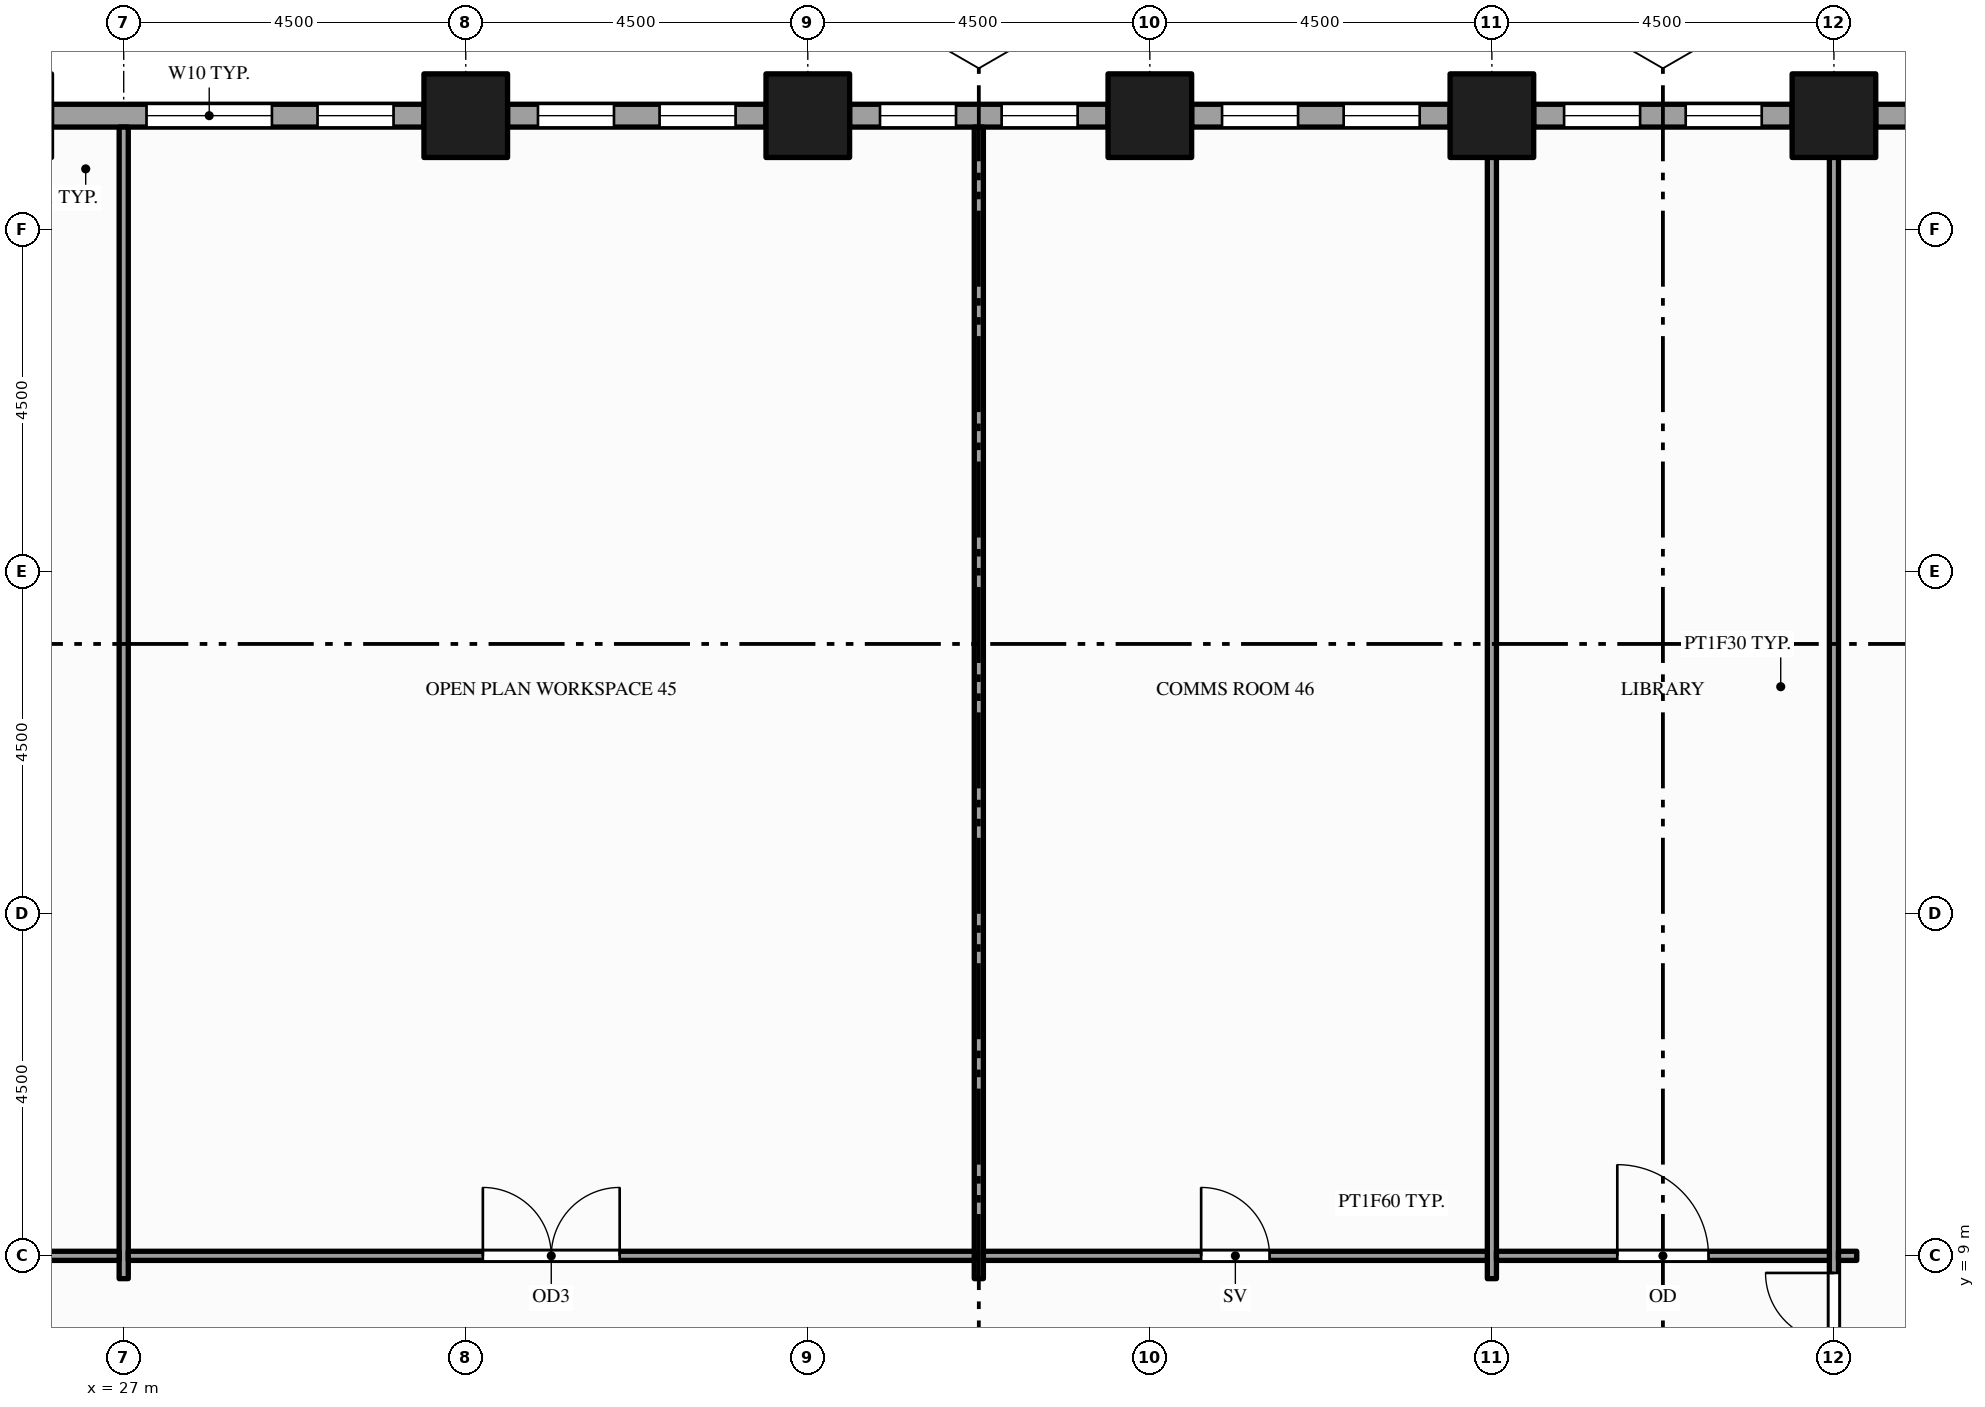
"""IFC4 building model, lengths in metres.
Left out: names, types, materials, properties, quantities, classifications, styles, units other than length and angle.
Written with IfcOpenShell. Run it as: python <this file> out.ifc"""

import sys

from ifc_helpers import new_model, si_unit, direction, frame, frame_2d, origin, origin_2d, place, context, subcontext, project, spatial, rectangle, hollow_rectangle, extrude, element, fill, save


model = new_model("IFC4")
c1 = context("Model", 3, precision=1e-05, world=origin(), true_north=direction((0.0, 1.0)))
c2 = subcontext(c1, "Body", "Model", "MODEL_VIEW")
j1 = project(units=[si_unit("LENGTHUNIT", "METRE"), si_unit("PLANEANGLEUNIT", "RADIAN")], contexts=[c1])
p1 = place(None, origin())
s1 = spatial("IfcSite", under=j1, at=p1, CompositionType="ELEMENT")
p2 = place(p1, origin())
s2 = spatial("IfcBuilding", under=s1, at=p2, CompositionType="ELEMENT")
p3 = place(p2, frame((0.0, 0.0, 49.0)))
s3 = spatial("IfcBuildingStorey", under=s2, at=p3, CompositionType="ELEMENT", Elevation=49.0)
for number, where, z_axis, x_axis in (
    (1, (31.5, 24.0, -0.15), (0.0, 0.0, 1.0), (1.0, 0.0, 0.0)),
    (2, (36.0, 24.0, -0.15), (0.0, 0.0, 1.0), (1.0, 0.0, 0.0)),
    (3, (40.5, 24.0, -0.15), (0.0, 0.0, 1.0), (1.0, 0.0, 0.0)),
    (4, (45.0, 24.0, -0.15), (0.0, 0.0, 1.0), (1.0, 0.0, 0.0)),
    (5, (49.5, 24.0, -0.15), (0.0, 0.0, 1.0), (1.0, 0.0, 0.0)),
):
    element("IfcColumn", number, at=place(p3, frame(where, z_axis=z_axis, x_axis=x_axis)), inside=s3, PredefinedType="COLUMN", context=c2, shape_type="SweptSolid", body=[
        extrude(hollow_rectangle(XDim=1.1, YDim=1.1, WallThickness=0.06, at=origin_2d()), origin(), (0.0, 0.0, 1.0), 4.0),
    ])
p4 = place(p3, frame((53.45, 24.0, 0.0), z_axis=(0.0, 0.0, 1.0), x_axis=(-1.0, 0.0, 0.0)))
e6 = element("IfcWall", 6, at=p4, inside=s3, PredefinedType="STANDARD", context=c2, shape_type="SweptSolid", body=[
    extrude(rectangle(XDim=3.4, YDim=0.3, at=frame_2d((1.7, 0.0))), origin(), (0.0, 0.0, 1.0), 3.144),
])
p5 = place(p4, frame((0.4, 0.0, 0.9)))
e7 = element("IfcOpeningElement", 7, at=p5, cuts=e6, PredefinedType="OPENING", context=c2, shape_type="SweptSolid", body=[
    extrude(rectangle(XDim=1.0, YDim=2.0, at=frame_2d((0.5, 1.0))), frame((0.0, 0.16, 0.0), z_axis=(0.0, -1.0, 0.0), x_axis=(1.0, 0.0, 0.0)), (0.0, 0.0, 1.0), 0.32),
])
p6 = place(p4, frame((2.0, 0.0, 0.9)))
e8 = element("IfcOpeningElement", 8, at=p6, cuts=e6, PredefinedType="OPENING", context=c2, shape_type="SweptSolid", body=[
    extrude(rectangle(XDim=1.0, YDim=2.0, at=frame_2d((0.5, 1.0))), frame((0.0, 0.16, 0.0), z_axis=(0.0, -1.0, 0.0), x_axis=(1.0, 0.0, 0.0)), (0.0, 0.0, 1.0), 0.32),
])
p7 = place(p3, frame((48.95, 24.0, 0.0), z_axis=(0.0, 0.0, 1.0), x_axis=(-1.0, 0.0, 0.0)))
e9 = element("IfcWall", 9, at=p7, inside=s3, PredefinedType="STANDARD", context=c2, shape_type="SweptSolid", body=[
    extrude(rectangle(XDim=3.4, YDim=0.3, at=frame_2d((1.7, 0.0))), origin(), (0.0, 0.0, 1.0), 3.144),
])
p8 = place(p7, frame((0.4, 0.0, 0.9)))
e10 = element("IfcOpeningElement", 10, at=p8, cuts=e9, PredefinedType="OPENING", context=c2, shape_type="SweptSolid", body=[
    extrude(rectangle(XDim=1.0, YDim=2.0, at=frame_2d((0.5, 1.0))), frame((0.0, 0.16, 0.0), z_axis=(0.0, -1.0, 0.0), x_axis=(1.0, 0.0, 0.0)), (0.0, 0.0, 1.0), 0.32),
])
p9 = place(p7, frame((2.0, 0.0, 0.9)))
e11 = element("IfcOpeningElement", 11, at=p9, cuts=e9, PredefinedType="OPENING", context=c2, shape_type="SweptSolid", body=[
    extrude(rectangle(XDim=1.0, YDim=2.0, at=frame_2d((0.5, 1.0))), frame((0.0, 0.16, 0.0), z_axis=(0.0, -1.0, 0.0), x_axis=(1.0, 0.0, 0.0)), (0.0, 0.0, 1.0), 0.32),
])
p10 = place(p3, frame((44.45, 24.0, 0.0), z_axis=(0.0, 0.0, 1.0), x_axis=(-1.0, 0.0, 0.0)))
e12 = element("IfcWall", 12, at=p10, inside=s3, PredefinedType="STANDARD", context=c2, shape_type="SweptSolid", body=[
    extrude(rectangle(XDim=3.4, YDim=0.3, at=frame_2d((1.7, 0.0))), origin(), (0.0, 0.0, 1.0), 3.144),
])
p11 = place(p10, frame((0.4, 0.0, 0.9)))
e13 = element("IfcOpeningElement", 13, at=p11, cuts=e12, PredefinedType="OPENING", context=c2, shape_type="SweptSolid", body=[
    extrude(rectangle(XDim=1.0, YDim=2.0, at=frame_2d((0.5, 1.0))), frame((0.0, 0.16, 0.0), z_axis=(0.0, -1.0, 0.0), x_axis=(1.0, 0.0, 0.0)), (0.0, 0.0, 1.0), 0.32),
])
p12 = place(p10, frame((2.0, 0.0, 0.9)))
e14 = element("IfcOpeningElement", 14, at=p12, cuts=e12, PredefinedType="OPENING", context=c2, shape_type="SweptSolid", body=[
    extrude(rectangle(XDim=1.0, YDim=2.0, at=frame_2d((0.5, 1.0))), frame((0.0, 0.16, 0.0), z_axis=(0.0, -1.0, 0.0), x_axis=(1.0, 0.0, 0.0)), (0.0, 0.0, 1.0), 0.32),
])
p13 = place(p3, frame((39.95, 24.0, 0.0), z_axis=(0.0, 0.0, 1.0), x_axis=(-1.0, 0.0, 0.0)))
e15 = element("IfcWall", 15, at=p13, inside=s3, PredefinedType="STANDARD", context=c2, shape_type="SweptSolid", body=[
    extrude(rectangle(XDim=3.4, YDim=0.3, at=frame_2d((1.7, 0.0))), origin(), (0.0, 0.0, 1.0), 3.144),
])
p14 = place(p13, frame((0.4, 0.0, 0.9)))
e16 = element("IfcOpeningElement", 16, at=p14, cuts=e15, PredefinedType="OPENING", context=c2, shape_type="SweptSolid", body=[
    extrude(rectangle(XDim=1.0, YDim=2.0, at=frame_2d((0.5, 1.0))), frame((0.0, 0.16, 0.0), z_axis=(0.0, -1.0, 0.0), x_axis=(1.0, 0.0, 0.0)), (0.0, 0.0, 1.0), 0.32),
])
p15 = place(p13, frame((2.0, 0.0, 0.9)))
e17 = element("IfcOpeningElement", 17, at=p15, cuts=e15, PredefinedType="OPENING", context=c2, shape_type="SweptSolid", body=[
    extrude(rectangle(XDim=1.0, YDim=2.0, at=frame_2d((0.5, 1.0))), frame((0.0, 0.16, 0.0), z_axis=(0.0, -1.0, 0.0), x_axis=(1.0, 0.0, 0.0)), (0.0, 0.0, 1.0), 0.32),
])
p16 = place(p3, frame((35.45, 24.0, 0.0), z_axis=(0.0, 0.0, 1.0), x_axis=(-1.0, 0.0, 0.0)))
e18 = element("IfcWall", 18, at=p16, inside=s3, PredefinedType="STANDARD", context=c2, shape_type="SweptSolid", body=[
    extrude(rectangle(XDim=3.4, YDim=0.3, at=frame_2d((1.7, 0.0))), origin(), (0.0, 0.0, 1.0), 3.144),
])
p17 = place(p16, frame((0.4, 0.0, 0.9)))
e19 = element("IfcOpeningElement", 19, at=p17, cuts=e18, PredefinedType="OPENING", context=c2, shape_type="SweptSolid", body=[
    extrude(rectangle(XDim=1.0, YDim=2.0, at=frame_2d((0.5, 1.0))), frame((0.0, 0.16, 0.0), z_axis=(0.0, -1.0, 0.0), x_axis=(1.0, 0.0, 0.0)), (0.0, 0.0, 1.0), 0.32),
])
p18 = place(p16, frame((2.0, 0.0, 0.9)))
e20 = element("IfcOpeningElement", 20, at=p18, cuts=e18, PredefinedType="OPENING", context=c2, shape_type="SweptSolid", body=[
    extrude(rectangle(XDim=1.0, YDim=2.0, at=frame_2d((0.5, 1.0))), frame((0.0, 0.16, 0.0), z_axis=(0.0, -1.0, 0.0), x_axis=(1.0, 0.0, 0.0)), (0.0, 0.0, 1.0), 0.32),
])
p19 = place(p3, frame((30.95, 24.0, 0.0), z_axis=(0.0, 0.0, 1.0), x_axis=(-1.0, 0.0, 0.0)))
e21 = element("IfcWall", 21, at=p19, inside=s3, PredefinedType="STANDARD", context=c2, shape_type="SweptSolid", body=[
    extrude(rectangle(XDim=4.9, YDim=0.3, at=frame_2d((2.45, 0.0))), origin(), (0.0, 0.0, 1.0), 3.144),
])
p20 = place(p19, frame((0.4, 0.0, 0.9)))
e22 = element("IfcOpeningElement", 22, at=p20, cuts=e21, PredefinedType="OPENING", context=c2, shape_type="SweptSolid", body=[
    extrude(rectangle(XDim=1.0, YDim=2.0, at=frame_2d((0.5, 1.0))), frame((0.0, 0.16, 0.0), z_axis=(0.0, -1.0, 0.0), x_axis=(1.0, 0.0, 0.0)), (0.0, 0.0, 1.0), 0.32),
])
p21 = place(p19, frame((2.0, 0.0, 0.9)))
e23 = element("IfcOpeningElement", 23, at=p21, cuts=e21, PredefinedType="OPENING", context=c2, shape_type="SweptSolid", body=[
    extrude(rectangle(XDim=1.65, YDim=2.0, at=frame_2d((0.825, 1.0))), frame((0.0, 0.16, 0.0), z_axis=(0.0, -1.0, 0.0), x_axis=(1.0, 0.0, 0.0)), (0.0, 0.0, 1.0), 0.32),
])
for number, where, z_axis, x_axis in (
    (24, (27.0, 8.7, 0.0), (0.0, 0.0, 1.0), (0.0, 1.0, 0.0)),
    (25, (38.25, 8.7, 0.0), (0.0, 0.0, 1.0), (0.0, 1.0, 0.0)),
    (26, (45.0, 8.7, 0.0), (0.0, 0.0, 1.0), (0.0, 1.0, 0.0)),
):
    element("IfcWall", number, at=place(p3, frame(where, z_axis=z_axis, x_axis=x_axis)), inside=s3, PredefinedType="PARTITIONING", context=c2, shape_type="SweptSolid", body=[
        extrude(rectangle(XDim=15.15, YDim=0.12, at=frame_2d((7.575, 0.0))), origin(), (0.0, 0.0, 1.0), 2.938),
    ])
p22 = place(p3, frame((49.5, 1.65, 0.0), z_axis=(0.0, 0.0, 1.0), x_axis=(0.0, 1.0, 0.0)))
e27 = element("IfcWall", 27, at=p22, inside=s3, PredefinedType="PARTITIONING", context=c2, shape_type="SweptSolid", body=[
    extrude(rectangle(XDim=22.2, YDim=0.12, at=frame_2d((11.1, 0.0))), origin(), (0.0, 0.0, 1.0), 2.938),
])
p23 = place(p22, frame((5.325, 0.0, 0.0)))
e28 = element("IfcOpeningElement", 28, at=p23, cuts=e27, PredefinedType="OPENING", context=c2, shape_type="SweptSolid", body=[
    extrude(rectangle(XDim=1.8, YDim=2.1, at=frame_2d((0.9, 1.05))), frame((0.0, 0.07, 0.0), z_axis=(0.0, -1.0, 0.0), x_axis=(1.0, 0.0, 0.0)), (0.0, 0.0, 1.0), 0.14),
])
p24 = place(p22, frame((0.54, 0.0, 0.0)))
e29 = element("IfcOpeningElement", 29, at=p24, cuts=e27, PredefinedType="OPENING", context=c2, shape_type="SweptSolid", body=[
    extrude(rectangle(XDim=0.9, YDim=2.1, at=frame_2d((0.45, 1.05))), frame((0.0, 0.07, 0.0), z_axis=(0.0, -1.0, 0.0), x_axis=(1.0, 0.0, 0.0)), (0.0, 0.0, 1.0), 0.14),
])
p25 = place(p22, frame((2.025, 0.0, 0.0)))
e30 = element("IfcOpeningElement", 30, at=p25, cuts=e27, PredefinedType="OPENING", context=c2, shape_type="SweptSolid", body=[
    extrude(rectangle(XDim=0.9, YDim=2.1, at=frame_2d((0.45, 1.05))), frame((0.0, 0.07, 0.0), z_axis=(0.0, -1.0, 0.0), x_axis=(1.0, 0.0, 0.0)), (0.0, 0.0, 1.0), 0.14),
])
p26 = place(p22, frame((3.51, 0.0, 0.0)))
e31 = element("IfcOpeningElement", 31, at=p26, cuts=e27, PredefinedType="OPENING", context=c2, shape_type="SweptSolid", body=[
    extrude(rectangle(XDim=1.0, YDim=2.1, at=frame_2d((0.5, 1.05))), frame((0.0, 0.07, 0.0), z_axis=(0.0, -1.0, 0.0), x_axis=(1.0, 0.0, 0.0)), (0.0, 0.0, 1.0), 0.14),
])
p27 = place(p3, frame((13.56, 9.0, 0.0), z_axis=(0.0, 0.0, 1.0), x_axis=(1.0, 0.0, 0.0)))
e32 = element("IfcWall", 32, at=p27, inside=s3, PredefinedType="PARTITIONING", context=c2, shape_type="SweptSolid", body=[
    extrude(rectangle(XDim=13.38, YDim=0.12, at=frame_2d((6.69, 0.0))), origin(), (0.0, 0.0, 1.0), 2.938),
])
p28 = place(p27, frame((3.54, 0.0, 0.0)))
e33 = element("IfcOpeningElement", 33, at=p28, cuts=e32, PredefinedType="OPENING", context=c2, shape_type="SweptSolid", body=[
    extrude(rectangle(XDim=1.8, YDim=2.1, at=frame_2d((0.9, 1.05))), frame((0.0, 0.07, 0.0), z_axis=(0.0, -1.0, 0.0), x_axis=(1.0, 0.0, 0.0)), (0.0, 0.0, 1.0), 0.14),
])
p29 = place(p3, frame((27.06, 9.0, 0.0), z_axis=(0.0, 0.0, 1.0), x_axis=(1.0, 0.0, 0.0)))
e34 = element("IfcWall", 34, at=p29, inside=s3, PredefinedType="PARTITIONING", context=c2, shape_type="SweptSolid", body=[
    extrude(rectangle(XDim=11.13, YDim=0.12, at=frame_2d((5.565, 0.0))), origin(), (0.0, 0.0, 1.0), 2.938),
])
p30 = place(p29, frame((4.665, 0.0, 0.0)))
e35 = element("IfcOpeningElement", 35, at=p30, cuts=e34, PredefinedType="OPENING", context=c2, shape_type="SweptSolid", body=[
    extrude(rectangle(XDim=1.8, YDim=2.1, at=frame_2d((0.9, 1.05))), frame((0.0, 0.07, 0.0), z_axis=(0.0, -1.0, 0.0), x_axis=(1.0, 0.0, 0.0)), (0.0, 0.0, 1.0), 0.14),
])
p31 = place(p3, frame((38.31, 9.0, 0.0), z_axis=(0.0, 0.0, 1.0), x_axis=(1.0, 0.0, 0.0)))
e36 = element("IfcWall", 36, at=p31, inside=s3, PredefinedType="PARTITIONING", context=c2, shape_type="SweptSolid", body=[
    extrude(rectangle(XDim=6.63, YDim=0.12, at=frame_2d((3.315, 0.0))), origin(), (0.0, 0.0, 1.0), 2.938),
])
p32 = place(p31, frame((2.865, 0.0, 0.0)))
e37 = element("IfcOpeningElement", 37, at=p32, cuts=e36, PredefinedType="OPENING", context=c2, shape_type="SweptSolid", body=[
    extrude(rectangle(XDim=0.9, YDim=2.1, at=frame_2d((0.45, 1.05))), frame((0.0, 0.07, 0.0), z_axis=(0.0, -1.0, 0.0), x_axis=(1.0, 0.0, 0.0)), (0.0, 0.0, 1.0), 0.14),
])
p33 = place(p3, frame((45.06, 9.0, 0.0), z_axis=(0.0, 0.0, 1.0), x_axis=(1.0, 0.0, 0.0)))
e38 = element("IfcWall", 38, at=p33, inside=s3, PredefinedType="PARTITIONING", context=c2, shape_type="SweptSolid", body=[
    extrude(rectangle(XDim=4.38, YDim=0.12, at=frame_2d((2.19, 0.0))), origin(), (0.0, 0.0, 1.0), 2.938),
])
p34 = place(p33, frame((1.59, 0.0, 0.0)))
e39 = element("IfcOpeningElement", 39, at=p34, cuts=e38, PredefinedType="OPENING", context=c2, shape_type="SweptSolid", body=[
    extrude(rectangle(XDim=1.2, YDim=2.1, at=frame_2d((0.6, 1.05))), frame((0.0, 0.07, 0.0), z_axis=(0.0, -1.0, 0.0), x_axis=(1.0, 0.0, 0.0)), (0.0, 0.0, 1.0), 0.14),
])
p35 = place(p3, frame((49.56, 9.0, 0.0), z_axis=(0.0, 0.0, 1.0), x_axis=(1.0, 0.0, 0.0)))
e40 = element("IfcWall", 40, at=p35, inside=s3, PredefinedType="PARTITIONING", context=c2, shape_type="SweptSolid", body=[
    extrude(rectangle(XDim=0.24, YDim=0.12, at=frame_2d((0.12, 0.0))), origin(), (0.0, 0.0, 1.0), 2.938),
])
p36 = place(p8, origin())
e41 = element("IfcWindow", 41, at=p36, inside=s3, PartitioningType="SINGLE_PANEL", PredefinedType="WINDOW", context=c2, shape_type="SweptSolid", body=[
    extrude(rectangle(XDim=1.0, YDim=2.0, at=frame_2d((0.5, 1.0))), frame((0.0, 0.03, 0.0), z_axis=(0.0, -1.0, 0.0), x_axis=(1.0, 0.0, 0.0)), (0.0, 0.0, 1.0), 0.06),
])
fill(e10, e41)
p37 = place(p9, origin())
e42 = element("IfcWindow", 42, at=p37, inside=s3, PartitioningType="SINGLE_PANEL", PredefinedType="WINDOW", context=c2, shape_type="SweptSolid", body=[
    extrude(rectangle(XDim=1.0, YDim=2.0, at=frame_2d((0.5, 1.0))), frame((0.0, 0.03, 0.0), z_axis=(0.0, -1.0, 0.0), x_axis=(1.0, 0.0, 0.0)), (0.0, 0.0, 1.0), 0.06),
])
fill(e11, e42)
p38 = place(p11, origin())
e43 = element("IfcWindow", 43, at=p38, inside=s3, PartitioningType="SINGLE_PANEL", PredefinedType="WINDOW", context=c2, shape_type="SweptSolid", body=[
    extrude(rectangle(XDim=1.0, YDim=2.0, at=frame_2d((0.5, 1.0))), frame((0.0, 0.03, 0.0), z_axis=(0.0, -1.0, 0.0), x_axis=(1.0, 0.0, 0.0)), (0.0, 0.0, 1.0), 0.06),
])
fill(e13, e43)
p39 = place(p12, origin())
e44 = element("IfcWindow", 44, at=p39, inside=s3, PartitioningType="SINGLE_PANEL", PredefinedType="WINDOW", context=c2, shape_type="SweptSolid", body=[
    extrude(rectangle(XDim=1.0, YDim=2.0, at=frame_2d((0.5, 1.0))), frame((0.0, 0.03, 0.0), z_axis=(0.0, -1.0, 0.0), x_axis=(1.0, 0.0, 0.0)), (0.0, 0.0, 1.0), 0.06),
])
fill(e14, e44)
p40 = place(p14, origin())
e45 = element("IfcWindow", 45, at=p40, inside=s3, PartitioningType="SINGLE_PANEL", PredefinedType="WINDOW", context=c2, shape_type="SweptSolid", body=[
    extrude(rectangle(XDim=1.0, YDim=2.0, at=frame_2d((0.5, 1.0))), frame((0.0, 0.03, 0.0), z_axis=(0.0, -1.0, 0.0), x_axis=(1.0, 0.0, 0.0)), (0.0, 0.0, 1.0), 0.06),
])
fill(e16, e45)
p41 = place(p15, origin())
e46 = element("IfcWindow", 46, at=p41, inside=s3, PartitioningType="SINGLE_PANEL", PredefinedType="WINDOW", context=c2, shape_type="SweptSolid", body=[
    extrude(rectangle(XDim=1.0, YDim=2.0, at=frame_2d((0.5, 1.0))), frame((0.0, 0.03, 0.0), z_axis=(0.0, -1.0, 0.0), x_axis=(1.0, 0.0, 0.0)), (0.0, 0.0, 1.0), 0.06),
])
fill(e17, e46)
p42 = place(p17, origin())
e47 = element("IfcWindow", 47, at=p42, inside=s3, PartitioningType="SINGLE_PANEL", PredefinedType="WINDOW", context=c2, shape_type="SweptSolid", body=[
    extrude(rectangle(XDim=1.0, YDim=2.0, at=frame_2d((0.5, 1.0))), frame((0.0, 0.03, 0.0), z_axis=(0.0, -1.0, 0.0), x_axis=(1.0, 0.0, 0.0)), (0.0, 0.0, 1.0), 0.06),
])
fill(e19, e47)
p43 = place(p18, origin())
e48 = element("IfcWindow", 48, at=p43, inside=s3, PartitioningType="SINGLE_PANEL", PredefinedType="WINDOW", context=c2, shape_type="SweptSolid", body=[
    extrude(rectangle(XDim=1.0, YDim=2.0, at=frame_2d((0.5, 1.0))), frame((0.0, 0.03, 0.0), z_axis=(0.0, -1.0, 0.0), x_axis=(1.0, 0.0, 0.0)), (0.0, 0.0, 1.0), 0.06),
])
fill(e20, e48)
p44 = place(p20, origin())
e49 = element("IfcWindow", 49, at=p44, inside=s3, PartitioningType="SINGLE_PANEL", PredefinedType="WINDOW", context=c2, shape_type="SweptSolid", body=[
    extrude(rectangle(XDim=1.0, YDim=2.0, at=frame_2d((0.5, 1.0))), frame((0.0, 0.03, 0.0), z_axis=(0.0, -1.0, 0.0), x_axis=(1.0, 0.0, 0.0)), (0.0, 0.0, 1.0), 0.06),
])
fill(e22, e49)
p45 = place(p21, origin())
e50 = element("IfcWindow", 50, at=p45, inside=s3, PartitioningType="SINGLE_PANEL", PredefinedType="WINDOW", context=c2, shape_type="SweptSolid", body=[
    extrude(rectangle(XDim=1.65, YDim=2.0, at=frame_2d((0.825, 1.0))), frame((0.0, 0.03, 0.0), z_axis=(0.0, -1.0, 0.0), x_axis=(1.0, 0.0, 0.0)), (0.0, 0.0, 1.0), 0.06),
])
fill(e23, e50)
p46 = place(p23, origin())
e51 = element("IfcDoor", 51, at=p46, inside=s3, OperationType="DOUBLE_DOOR_SINGLE_SWING", PredefinedType="DOOR", context=c2, shape_type="SweptSolid", body=[
    extrude(rectangle(XDim=1.8, YDim=2.1, at=frame_2d((0.9, 1.05))), frame((0.0, 0.025, 0.0), z_axis=(0.0, -1.0, 0.0), x_axis=(1.0, 0.0, 0.0)), (0.0, 0.0, 1.0), 0.05),
])
fill(e28, e51)
p47 = place(p30, origin())
e52 = element("IfcDoor", 52, at=p47, inside=s3, OperationType="DOUBLE_DOOR_SINGLE_SWING", PredefinedType="DOOR", context=c2, shape_type="SweptSolid", body=[
    extrude(rectangle(XDim=1.8, YDim=2.1, at=frame_2d((0.9, 1.05))), frame((0.0, 0.025, 0.0), z_axis=(0.0, -1.0, 0.0), x_axis=(1.0, 0.0, 0.0)), (0.0, 0.0, 1.0), 0.05),
])
fill(e35, e52)
p48 = place(p32, origin())
e53 = element("IfcDoor", 53, at=p48, inside=s3, OperationType="SINGLE_SWING_LEFT", PredefinedType="DOOR", context=c2, shape_type="SweptSolid", body=[
    extrude(rectangle(XDim=0.9, YDim=2.1, at=frame_2d((0.45, 1.05))), frame((0.0, 0.025, 0.0), z_axis=(0.0, -1.0, 0.0), x_axis=(1.0, 0.0, 0.0)), (0.0, 0.0, 1.0), 0.05),
])
fill(e37, e53)
p49 = place(p34, origin())
e54 = element("IfcDoor", 54, at=p49, inside=s3, OperationType="SINGLE_SWING_LEFT", PredefinedType="DOOR", context=c2, shape_type="SweptSolid", body=[
    extrude(rectangle(XDim=1.2, YDim=2.1, at=frame_2d((0.6, 1.05))), frame((0.0, 0.025, 0.0), z_axis=(0.0, -1.0, 0.0), x_axis=(1.0, 0.0, 0.0)), (0.0, 0.0, 1.0), 0.05),
])
fill(e39, e54)
save(model, sys.argv[1])
